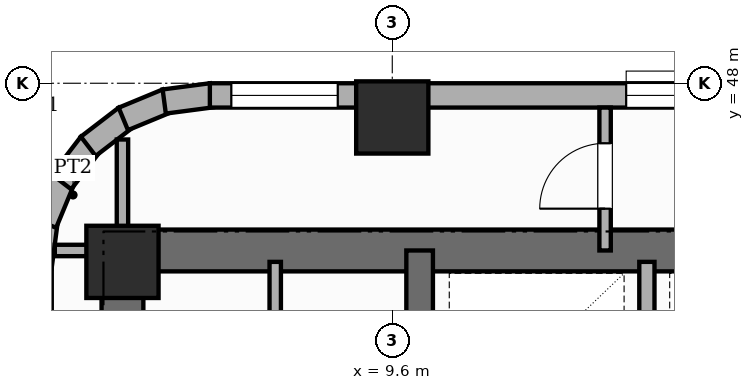
"""IFC4 building model, lengths in metres.
Left out: names, types, materials, properties, quantities, classifications, styles, units other than length and angle.
Written with IfcOpenShell. Run it as: python <this file> out.ifc"""

import sys

from ifc_helpers import new_model, si_unit, direction, frame, frame_2d, origin, origin_2d, place, context, subcontext, project, spatial, rectangle, extrude, element, fill, save


model = new_model("IFC4")
c1 = context("Model", 3, precision=1e-05, world=origin(), true_north=direction((0.0, 1.0)))
c2 = subcontext(c1, "Body", "Model", "MODEL_VIEW")
j1 = project(units=[si_unit("LENGTHUNIT", "METRE"), si_unit("PLANEANGLEUNIT", "RADIAN")], contexts=[c1])
p1 = place(None, origin())
s1 = spatial("IfcSite", under=j1, at=p1, CompositionType="ELEMENT")
p2 = place(p1, origin())
s2 = spatial("IfcBuilding", under=s1, at=p2, CompositionType="ELEMENT")
p3 = place(p2, frame((0.0, 0.0, 154.0)))
s3 = spatial("IfcBuildingStorey", under=s2, at=p3, CompositionType="ELEMENT", Elevation=154.0)
p4 = place(p3, frame((6.05, 30.625, 0.0), z_axis=(0.0, 0.0, 1.0), x_axis=(0.0, 1.0, 0.0)))
e1 = element("IfcWall", 1, at=p4, inside=s3, PredefinedType="SHEAR", context=c2, shape_type="SweptSolid", body=[
    extrude(rectangle(XDim=15.45, YDim=0.55, at=frame_2d((7.725, 0.0))), origin(), (0.0, 0.0, 1.0), 3.6),
])
p5 = place(p4, frame((10.725, 0.0, 0.0)))
e2 = element("IfcOpeningElement", 2, at=p5, cuts=e1, PredefinedType="OPENING", context=c2, shape_type="SweptSolid", body=[
    extrude(rectangle(XDim=0.95, YDim=2.15, at=frame_2d((0.475, 1.075))), frame((0.0, 0.285, 0.0), z_axis=(0.0, -1.0, 0.0), x_axis=(1.0, 0.0, 0.0)), (0.0, 0.0, 1.0), 0.57),
])
p6 = place(p3, frame((6.05, 45.8, 0.0), z_axis=(0.0, 0.0, 1.0), x_axis=(1.0, 0.0, 0.0)))
e3 = element("IfcWall", 3, at=p6, inside=s3, PredefinedType="SHEAR", context=c2, shape_type="SweptSolid", body=[
    extrude(rectangle(XDim=16.7, YDim=0.55, at=frame_2d((8.35, 0.0))), origin(), (0.0, 0.0, 1.0), 3.6),
])
p7 = place(p3, frame((9.96, 30.9, 0.0), z_axis=(0.0, 0.0, 1.0), x_axis=(0.0, 1.0, 0.0)))
e4 = element("IfcWall", 4, at=p7, inside=s3, PredefinedType="SHEAR", context=c2, shape_type="SweptSolid", body=[
    extrude(rectangle(XDim=14.9, YDim=0.35, at=frame_2d((7.45, 0.0))), origin(), (0.0, 0.0, 1.0), 3.6),
])
p8 = place(p7, frame((0.65, 0.0, 0.0)))
e5 = element("IfcOpeningElement", 5, at=p8, cuts=e4, PredefinedType="OPENING", context=c2, shape_type="SweptSolid", body=[
    extrude(rectangle(XDim=0.95, YDim=2.1, at=frame_2d((0.475, 1.05))), frame((0.0, 0.185, 0.0), z_axis=(0.0, -1.0, 0.0), x_axis=(1.0, 0.0, 0.0)), (0.0, 0.0, 1.0), 0.37),
])
p9 = place(p7, frame((10.45, 0.0, 0.0)))
e6 = element("IfcOpeningElement", 6, at=p9, cuts=e4, PredefinedType="OPENING", context=c2, shape_type="SweptSolid", body=[
    extrude(rectangle(XDim=1.0, YDim=2.15, at=frame_2d((0.5, 1.075))), frame((0.0, 0.185, 0.0), z_axis=(0.0, -1.0, 0.0), x_axis=(1.0, 0.0, 0.0)), (0.0, 0.0, 1.0), 0.37),
])
for number, where, z_axis, x_axis in (
    (7, (6.05, 45.65, 0.0), (0.0, 0.0, 1.0), (1.0, 0.0, 0.0)),
    (8, (9.6, 47.55, 0.0), (0.0, 0.0, 1.0), (1.0, 0.0, 0.0)),
):
    element("IfcColumn", number, at=place(p3, frame(where, z_axis=z_axis, x_axis=x_axis)), inside=s3, PredefinedType="COLUMN", context=c2, shape_type="SweptSolid", body=[
        extrude(rectangle(XDim=0.95, YDim=0.95, at=origin_2d()), origin(), (0.0, 0.0, 1.0), 3.6),
    ])
for number, where, z_axis, x_axis in (
    (9, (4.958, 45.579, 0.0), (0.0, 0.0, 1.0), (0.131, 0.991, 0.0)),
    (10, (5.03, 46.16, 0.0), (0.0, 0.0, 1.0), (0.383, 0.924, 0.0)),
):
    element("IfcWall", number, at=place(p3, frame(where, z_axis=z_axis, x_axis=x_axis)), inside=s3, PredefinedType="STANDARD", context=c2, shape_type="SweptSolid", body=[
        extrude(rectangle(XDim=0.626, YDim=0.32, at=frame_2d((0.313, 0.0))), origin(), (0.0, 0.0, 1.0), 3.36),
    ])
p10 = place(p3, frame((5.248, 46.703, 0.0), z_axis=(0.0, 0.0, 1.0), x_axis=(0.608938521285, 0.7932174212, 0.0)))
e11 = element("IfcWall", 11, at=p10, inside=s3, PredefinedType="STANDARD", context=c2, shape_type="SweptSolid", body=[
    extrude(rectangle(XDim=0.627, YDim=0.32, at=frame_2d((0.313, 0.0))), origin(), (0.0, 0.0, 1.0), 3.36),
])
p11 = place(p3, frame((5.6, 47.17, 0.0), z_axis=(0.0, 0.0, 1.0), x_axis=(0.793405610854, 0.608693302629, 0.0)))
e12 = element("IfcWall", 12, at=p11, inside=s3, PredefinedType="STANDARD", context=c2, shape_type="SweptSolid", body=[
    extrude(rectangle(XDim=0.626, YDim=0.32, at=frame_2d((0.313, 0.0))), origin(), (0.0, 0.0, 1.0), 3.36),
])
p12 = place(p3, frame((6.061, 47.531, 0.0), z_axis=(0.0, 0.0, 1.0), x_axis=(0.923836271867, 0.382787856107, 0.0)))
e13 = element("IfcWall", 13, at=p12, inside=s3, PredefinedType="STANDARD", context=c2, shape_type="SweptSolid", body=[
    extrude(rectangle(XDim=0.626, YDim=0.32, at=frame_2d((0.313, 0.0))), origin(), (0.0, 0.0, 1.0), 3.36),
])
p13 = place(p3, frame((6.6, 47.76, 0.0), z_axis=(0.0, 0.0, 1.0), x_axis=(0.991447664465, 0.130504898859, 0.0)))
e14 = element("IfcWall", 14, at=p13, inside=s3, PredefinedType="STANDARD", context=c2, shape_type="SweptSolid", body=[
    extrude(rectangle(XDim=0.627, YDim=0.32, at=frame_2d((0.313, 0.0))), origin(), (0.0, 0.0, 1.0), 3.36),
])
p14 = place(p3, frame((7.2, 47.84, 0.0), z_axis=(0.0, 0.0, 1.0), x_axis=(1.0, 0.0, 0.0)))
e15 = element("IfcWall", 15, at=p14, inside=s3, PredefinedType="STANDARD", context=c2, shape_type="SweptSolid", body=[
    extrude(rectangle(XDim=43.2, YDim=0.32, at=frame_2d((21.6, 0.0))), origin(), (0.0, 0.0, 1.0), 2.54),
])
p15 = place(p14, frame((19.002, 0.0, 0.65)))
e16 = element("IfcOpeningElement", 16, at=p15, cuts=e15, PredefinedType="OPENING", context=c2, shape_type="SweptSolid", body=[
    extrude(rectangle(XDim=1.4, YDim=1.1, at=frame_2d((0.7, 0.55))), frame((0.0, 0.17, 0.0), z_axis=(0.0, -1.0, 0.0), x_axis=(1.0, 0.0, 0.0)), (0.0, 0.0, 1.0), 0.34),
])
p16 = place(p14, frame((0.282, 0.0, 0.65)))
e17 = element("IfcOpeningElement", 17, at=p16, cuts=e15, PredefinedType="OPENING", context=c2, shape_type="SweptSolid", body=[
    extrude(rectangle(XDim=1.4, YDim=1.1, at=frame_2d((0.7, 0.55))), frame((0.0, 0.17, 0.0), z_axis=(0.0, -1.0, 0.0), x_axis=(1.0, 0.0, 0.0)), (0.0, 0.0, 1.0), 0.34),
])
p17 = place(p14, frame((5.478, 0.0, 0.45)))
e18 = element("IfcOpeningElement", 18, at=p17, cuts=e15, PredefinedType="OPENING", context=c2, shape_type="SweptSolid", body=[
    extrude(rectangle(XDim=0.95, YDim=1.8, at=frame_2d((0.475, 0.9))), frame((0.0, 0.17, 0.0), z_axis=(0.0, -1.0, 0.0), x_axis=(1.0, 0.0, 0.0)), (0.0, 0.0, 1.0), 0.34),
])
p18 = place(p3, frame((12.95, 43.1, 0.0), z_axis=(0.0, 0.0, 1.0), x_axis=(0.0, 1.0, 0.0)))
e19 = element("IfcWall", 19, at=p18, inside=s3, PredefinedType="POLYGONAL", context=c2, shape_type="SweptSolid", body=[
    extrude(rectangle(XDim=2.55, YDim=0.2, at=frame_2d((1.275, 0.0))), origin(), (0.0, 0.0, 1.0), 3.36),
])
p19 = place(p3, frame((8.06, 43.05, 0.0), z_axis=(0.0, 0.0, 1.0), x_axis=(0.0, 1.0, 0.0)))
e20 = element("IfcWall", 20, at=p19, inside=s3, PredefinedType="PARTITIONING", context=c2, shape_type="SweptSolid", body=[
    extrude(rectangle(XDim=2.6, YDim=0.15, at=frame_2d((1.3, 0.0))), origin(), (0.0, 0.0, 1.0), 3.36),
])
p20 = place(p3, frame((5.16, 45.8, 0.0), z_axis=(0.0, 0.0, 1.0), x_axis=(1.0, 0.0, 0.0)))
e21 = element("IfcWall", 21, at=p20, inside=s3, PredefinedType="PARTITIONING", context=c2, shape_type="SweptSolid", body=[
    extrude(rectangle(XDim=0.89, YDim=0.15, at=frame_2d((0.445, 0.0))), origin(), (0.0, 0.0, 1.0), 3.36),
])
p21 = place(p3, frame((6.05, 45.8, 0.0), z_axis=(0.0, 0.0, 1.0), x_axis=(0.0, 1.0, 0.0)))
e22 = element("IfcWall", 22, at=p21, inside=s3, PredefinedType="PARTITIONING", context=c2, shape_type="SweptSolid", body=[
    extrude(rectangle(XDim=1.46, YDim=0.15, at=frame_2d((0.73, 0.0))), origin(), (0.0, 0.0, 1.0), 3.36),
])
p22 = place(p3, frame((12.4, 45.8, 0.0), z_axis=(0.0, 0.0, 1.0), x_axis=(0.0, 1.0, 0.0)))
e23 = element("IfcWall", 23, at=p22, inside=s3, PredefinedType="PARTITIONING", context=c2, shape_type="SweptSolid", body=[
    extrude(rectangle(XDim=1.88, YDim=0.15, at=frame_2d((0.94, 0.0))), origin(), (0.0, 0.0, 1.0), 3.36),
])
p23 = place(p22, frame((0.55, 0.0, 0.0)))
e24 = element("IfcOpeningElement", 24, at=p23, cuts=e23, PredefinedType="OPENING", context=c2, shape_type="SweptSolid", body=[
    extrude(rectangle(XDim=0.86, YDim=2.1, at=frame_2d((0.43, 1.05))), frame((0.0, 0.085, 0.0), z_axis=(0.0, -1.0, 0.0), x_axis=(1.0, 0.0, 0.0)), (0.0, 0.0, 1.0), 0.17),
])
p24 = place(p16, origin())
e25 = element("IfcWindow", 25, at=p24, inside=s3, PartitioningType="SINGLE_PANEL", PredefinedType="WINDOW", context=c2, shape_type="SweptSolid", body=[
    extrude(rectangle(XDim=1.4, YDim=1.1, at=frame_2d((0.7, 0.55))), frame((0.0, 0.03, 0.0), z_axis=(0.0, -1.0, 0.0), x_axis=(1.0, 0.0, 0.0)), (0.0, 0.0, 1.0), 0.06),
])
fill(e17, e25)
p25 = place(p17, origin())
e26 = element("IfcWindow", 26, at=p25, inside=s3, PartitioningType="SINGLE_PANEL", PredefinedType="WINDOW", context=c2, shape_type="SweptSolid", body=[
    extrude(rectangle(XDim=0.95, YDim=1.8, at=frame_2d((0.475, 0.9))), frame((0.0, 0.03, 0.0), z_axis=(0.0, -1.0, 0.0), x_axis=(1.0, 0.0, 0.0)), (0.0, 0.0, 1.0), 0.06),
])
fill(e18, e26)
p26 = place(p23, origin())
e27 = element("IfcDoor", 27, at=p26, inside=s3, OperationType="SINGLE_SWING_LEFT", PredefinedType="DOOR", context=c2, shape_type="SweptSolid", body=[
    extrude(rectangle(XDim=0.86, YDim=2.1, at=frame_2d((0.43, 1.05))), frame((0.0, 0.025, 0.0), z_axis=(0.0, -1.0, 0.0), x_axis=(1.0, 0.0, 0.0)), (0.0, 0.0, 1.0), 0.05),
])
fill(e24, e27)
save(model, sys.argv[1])
